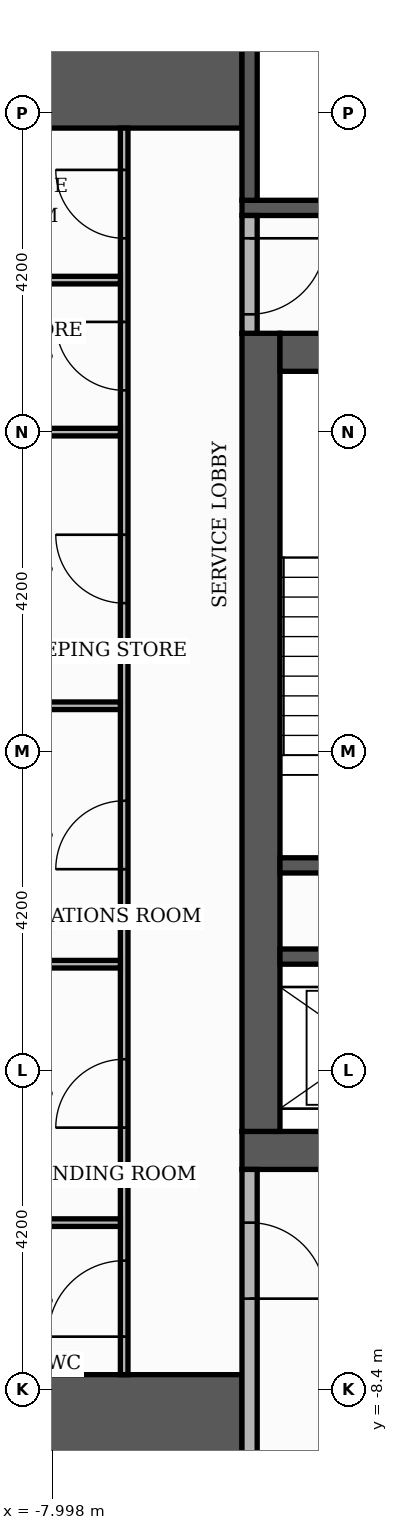
"""IFC4 building model, lengths in metres.
Left out: names, types, materials, properties, quantities, classifications, styles, units other than length and angle.
Written with IfcOpenShell. Run it as: python <this file> out.ifc"""

import sys

from ifc_helpers import new_model, si_unit, direction, frame, frame_2d, origin, place, context, subcontext, project, spatial, rectangle, extrude, element, fill, save


model = new_model("IFC4")
c1 = context("Model", 3, precision=1e-05, world=origin(), true_north=direction((0.0, 1.0)))
c2 = subcontext(c1, "Body", "Model", "MODEL_VIEW")
j1 = project(units=[si_unit("LENGTHUNIT", "METRE"), si_unit("PLANEANGLEUNIT", "RADIAN")], contexts=[c1])
p1 = place(None, origin())
s1 = spatial("IfcSite", under=j1, at=p1, CompositionType="ELEMENT")
p2 = place(p1, origin())
s2 = spatial("IfcBuilding", under=s1, at=p2, CompositionType="ELEMENT")
p3 = place(p2, frame((0.0, 0.0, 231.3)))
s3 = spatial("IfcBuildingStorey", under=s2, at=p3, CompositionType="ELEMENT", Elevation=231.3)
p4 = place(p3, frame((-5.5, -5.25, 0.0), z_axis=(0.0, 0.0, 1.0), x_axis=(1.0, 0.0, 0.0)))
e1 = element("IfcWall", 1, at=p4, inside=s3, PredefinedType="SHEAR", context=c2, shape_type="SweptSolid", body=[
    extrude(rectangle(XDim=11.0, YDim=0.5, at=frame_2d((5.5, 0.0))), origin(), (0.0, 0.0, 1.0), 3.4),
])
p5 = place(p4, frame((4.9, 0.0, 0.0)))
e2 = element("IfcOpeningElement", 2, at=p5, cuts=e1, PredefinedType="OPENING", context=c2, shape_type="SweptSolid", body=[
    extrude(rectangle(XDim=1.2, YDim=2.1, at=frame_2d((0.6, 1.05))), frame((0.0, 0.26, 0.0), z_axis=(0.0, -1.0, 0.0), x_axis=(1.0, 0.0, 0.0)), (0.0, 0.0, 1.0), 0.52),
])
p6 = place(p3, frame((-5.25, -5.0, 0.0), z_axis=(0.0, 0.0, 1.0), x_axis=(0.0, 1.0, 0.0)))
e3 = element("IfcWall", 3, at=p6, inside=s3, PredefinedType="SHEAR", context=c2, shape_type="SweptSolid", body=[
    extrude(rectangle(XDim=10.5, YDim=0.5, at=frame_2d((5.25, 0.0))), origin(), (0.0, 0.0, 1.0), 3.4),
])
p7 = place(p3, frame((-5.0, 5.25, 0.0), z_axis=(0.0, 0.0, 1.0), x_axis=(1.0, 0.0, 0.0)))
e4 = element("IfcWall", 4, at=p7, inside=s3, PredefinedType="SHEAR", context=c2, shape_type="SweptSolid", body=[
    extrude(rectangle(XDim=10.0, YDim=0.5, at=frame_2d((5.0, 0.0))), origin(), (0.0, 0.0, 1.0), 3.4),
])
p8 = place(p7, frame((4.4, 0.0, 0.0)))
e5 = element("IfcOpeningElement", 5, at=p8, cuts=e4, PredefinedType="OPENING", context=c2, shape_type="SweptSolid", body=[
    extrude(rectangle(XDim=1.2, YDim=2.1, at=frame_2d((0.6, 1.05))), frame((0.0, 0.26, 0.0), z_axis=(0.0, -1.0, 0.0), x_axis=(1.0, 0.0, 0.0)), (0.0, 0.0, 1.0), 0.52),
])
for number, where, z_axis, x_axis in (
    (6, (-10.1, -9.15, 0.0), (0.0, 0.0, 1.0), (1.0, 0.0, 0.0)),
    (7, (-10.1, 9.15, 0.0), (0.0, 0.0, 1.0), (1.0, 0.0, 0.0)),
):
    element("IfcWall", number, at=place(p3, frame(where, z_axis=z_axis, x_axis=x_axis)), inside=s3, PredefinedType="SHEAR", context=c2, shape_type="SweptSolid", body=[
        extrude(rectangle(XDim=4.6, YDim=1.9, at=frame_2d((2.3, 0.0))), origin(), (0.0, 0.0, 1.0), 3.4),
    ])
p9 = place(p3, frame((-5.0, -1.5, 0.0), z_axis=(0.0, 0.0, 1.0), x_axis=(1.0, 0.0, 0.0)))
e8 = element("IfcWall", 8, at=p9, inside=s3, PredefinedType="SHEAR", context=c2, shape_type="SweptSolid", body=[
    extrude(rectangle(XDim=3.05, YDim=0.2, at=frame_2d((1.525, 0.0))), origin(), (0.0, 0.0, 1.0), 3.4),
])
p10 = place(p3, frame((-5.5, 7.15, 0.0), z_axis=(0.0, 0.0, 1.0), x_axis=(1.0, 0.0, 0.0)))
e9 = element("IfcWall", 9, at=p10, inside=s3, PredefinedType="SHEAR", context=c2, shape_type="SweptSolid", body=[
    extrude(rectangle(XDim=6.8, YDim=0.2, at=frame_2d((3.4, 0.0))), origin(), (0.0, 0.0, 1.0), 3.4),
])
for number, where, z_axis, x_axis in (
    (10, (-5.4, 7.25, 0.0), (0.0, 0.0, 1.0), (0.0, 1.0, 0.0)),
    (11, (-5.0, -2.7, 0.0), (0.0, 0.0, 1.0), (1.0, 0.0, 0.0)),
):
    element("IfcWall", number, at=place(p3, frame(where, z_axis=z_axis, x_axis=x_axis)), inside=s3, PredefinedType="SHEAR", context=c2, shape_type="SweptSolid", body=[
        extrude(rectangle(XDim=2.85, YDim=0.2, at=frame_2d((1.425, 0.0))), origin(), (0.0, 0.0, 1.0), 3.4),
    ])
p11 = place(p3, frame((-5.4, -10.1, 0.0), z_axis=(0.0, 0.0, 1.0), x_axis=(0.0, 1.0, 0.0)))
e12 = element("IfcWall", 12, at=p11, inside=s3, PredefinedType="PARTITIONING", context=c2, shape_type="SweptSolid", body=[
    extrude(rectangle(XDim=4.6, YDim=0.2, at=frame_2d((2.3, 0.0))), origin(), (0.0, 0.0, 1.0), 3.4),
])
p12 = place(p11, frame((2.9, 0.0, 0.0)))
e13 = element("IfcOpeningElement", 13, at=p12, cuts=e12, PredefinedType="OPENING", context=c2, shape_type="SweptSolid", body=[
    extrude(rectangle(XDim=1.0, YDim=2.1, at=frame_2d((0.5, 1.05))), frame((0.0, 0.11, 0.0), z_axis=(0.0, -1.0, 0.0), x_axis=(1.0, 0.0, 0.0)), (0.0, 0.0, 1.0), 0.22),
])
p13 = place(p3, frame((-7.05, -8.2, 0.0), z_axis=(0.0, 0.0, 1.0), x_axis=(0.0, 1.0, 0.0)))
e14 = element("IfcWall", 14, at=p13, inside=s3, PredefinedType="PARTITIONING", context=c2, shape_type="SweptSolid", body=[
    extrude(rectangle(XDim=16.4, YDim=0.1, at=frame_2d((8.2, 0.0))), origin(), (0.0, 0.0, 1.0), 3.4),
])
p14 = place(p13, frame((0.5, 0.0, 0.0)))
e15 = element("IfcOpeningElement", 15, at=p14, cuts=e14, PredefinedType="OPENING", context=c2, shape_type="SweptSolid", body=[
    extrude(rectangle(XDim=1.0, YDim=2.1, at=frame_2d((0.5, 1.05))), frame((0.0, 0.06, 0.0), z_axis=(0.0, -1.0, 0.0), x_axis=(1.0, 0.0, 0.0)), (0.0, 0.0, 1.0), 0.12),
])
p15 = place(p13, frame((3.25, 0.0, 0.0)))
e16 = element("IfcOpeningElement", 16, at=p15, cuts=e14, PredefinedType="OPENING", context=c2, shape_type="SweptSolid", body=[
    extrude(rectangle(XDim=0.9, YDim=2.1, at=frame_2d((0.45, 1.05))), frame((0.0, 0.06, 0.0), z_axis=(0.0, -1.0, 0.0), x_axis=(1.0, 0.0, 0.0)), (0.0, 0.0, 1.0), 0.12),
])
p16 = place(p13, frame((6.65, 0.0, 0.0)))
e17 = element("IfcOpeningElement", 17, at=p16, cuts=e14, PredefinedType="OPENING", context=c2, shape_type="SweptSolid", body=[
    extrude(rectangle(XDim=0.9, YDim=2.1, at=frame_2d((0.45, 1.05))), frame((0.0, 0.06, 0.0), z_axis=(0.0, -1.0, 0.0), x_axis=(1.0, 0.0, 0.0)), (0.0, 0.0, 1.0), 0.12),
])
p17 = place(p13, frame((10.15, 0.0, 0.0)))
e18 = element("IfcOpeningElement", 18, at=p17, cuts=e14, PredefinedType="OPENING", context=c2, shape_type="SweptSolid", body=[
    extrude(rectangle(XDim=0.9, YDim=2.1, at=frame_2d((0.45, 1.05))), frame((0.0, 0.06, 0.0), z_axis=(0.0, -1.0, 0.0), x_axis=(1.0, 0.0, 0.0)), (0.0, 0.0, 1.0), 0.12),
])
p18 = place(p13, frame((12.95, 0.0, 0.0)))
e19 = element("IfcOpeningElement", 19, at=p18, cuts=e14, PredefinedType="OPENING", context=c2, shape_type="SweptSolid", body=[
    extrude(rectangle(XDim=0.9, YDim=2.1, at=frame_2d((0.45, 1.05))), frame((0.0, 0.06, 0.0), z_axis=(0.0, -1.0, 0.0), x_axis=(1.0, 0.0, 0.0)), (0.0, 0.0, 1.0), 0.12),
])
p19 = place(p13, frame((14.95, 0.0, 0.0)))
e20 = element("IfcOpeningElement", 20, at=p19, cuts=e14, PredefinedType="OPENING", context=c2, shape_type="SweptSolid", body=[
    extrude(rectangle(XDim=0.9, YDim=2.1, at=frame_2d((0.45, 1.05))), frame((0.0, 0.06, 0.0), z_axis=(0.0, -1.0, 0.0), x_axis=(1.0, 0.0, 0.0)), (0.0, 0.0, 1.0), 0.12),
])
for number, where, z_axis, x_axis in (
    (21, (-9.0, -6.2, 0.0), (0.0, 0.0, 1.0), (1.0, 0.0, 0.0)),
    (22, (-9.0, -2.8, 0.0), (0.0, 0.0, 1.0), (1.0, 0.0, 0.0)),
    (23, (-9.0, 0.6, 0.0), (0.0, 0.0, 1.0), (1.0, 0.0, 0.0)),
    (24, (-9.0, 4.2, 0.0), (0.0, 0.0, 1.0), (1.0, 0.0, 0.0)),
):
    element("IfcWall", number, at=place(p3, frame(where, z_axis=z_axis, x_axis=x_axis)), inside=s3, PredefinedType="PARTITIONING", context=c2, shape_type="SweptSolid", body=[
        extrude(rectangle(XDim=1.9, YDim=0.1, at=frame_2d((0.95, 0.0))), origin(), (0.0, 0.0, 1.0), 3.4),
    ])
p20 = place(p3, frame((-5.4, 5.5, 0.0), z_axis=(0.0, 0.0, 1.0), x_axis=(0.0, 1.0, 0.0)))
e25 = element("IfcWall", 25, at=p20, inside=s3, PredefinedType="PARTITIONING", context=c2, shape_type="SweptSolid", body=[
    extrude(rectangle(XDim=1.55, YDim=0.2, at=frame_2d((0.775, 0.0))), origin(), (0.0, 0.0, 1.0), 3.4),
])
p21 = place(p20, frame((0.25, 0.0, 0.0)))
e26 = element("IfcOpeningElement", 26, at=p21, cuts=e25, PredefinedType="OPENING", context=c2, shape_type="SweptSolid", body=[
    extrude(rectangle(XDim=1.0, YDim=2.1, at=frame_2d((0.5, 1.05))), frame((0.0, 0.11, 0.0), z_axis=(0.0, -1.0, 0.0), x_axis=(1.0, 0.0, 0.0)), (0.0, 0.0, 1.0), 0.22),
])
p22 = place(p3, frame((-9.0, 6.2, 0.0), z_axis=(0.0, 0.0, 1.0), x_axis=(1.0, 0.0, 0.0)))
e27 = element("IfcWall", 27, at=p22, inside=s3, PredefinedType="PARTITIONING", context=c2, shape_type="SweptSolid", body=[
    extrude(rectangle(XDim=1.9, YDim=0.1, at=frame_2d((0.95, 0.0))), origin(), (0.0, 0.0, 1.0), 3.4),
])
p23 = place(p21, frame((1.0, 0.0, 0.0), z_axis=(0.0, 0.0, 1.0), x_axis=(-1.0, 0.0, 0.0)))
e28 = element("IfcDoor", 28, at=p23, inside=s3, OperationType="SINGLE_SWING_RIGHT", PredefinedType="DOOR", context=c2, shape_type="SweptSolid", body=[
    extrude(rectangle(XDim=1.0, YDim=2.1, at=frame_2d((0.5, 1.05))), frame((0.0, 0.025, 0.0), z_axis=(0.0, -1.0, 0.0), x_axis=(1.0, 0.0, 0.0)), (0.0, 0.0, 1.0), 0.05),
])
fill(e26, e28)
p24 = place(p12, frame((1.0, 0.0, 0.0), z_axis=(0.0, 0.0, 1.0), x_axis=(-1.0, 0.0, 0.0)))
e29 = element("IfcDoor", 29, at=p24, inside=s3, OperationType="SINGLE_SWING_LEFT", PredefinedType="DOOR", context=c2, shape_type="SweptSolid", body=[
    extrude(rectangle(XDim=1.0, YDim=2.1, at=frame_2d((0.5, 1.05))), frame((0.0, 0.025, 0.0), z_axis=(0.0, -1.0, 0.0), x_axis=(1.0, 0.0, 0.0)), (0.0, 0.0, 1.0), 0.05),
])
fill(e13, e29)
p25 = place(p14, origin())
e30 = element("IfcDoor", 30, at=p25, inside=s3, OperationType="SINGLE_SWING_LEFT", PredefinedType="DOOR", context=c2, shape_type="SweptSolid", body=[
    extrude(rectangle(XDim=1.0, YDim=2.1, at=frame_2d((0.5, 1.05))), frame((0.0, 0.025, 0.0), z_axis=(0.0, -1.0, 0.0), x_axis=(1.0, 0.0, 0.0)), (0.0, 0.0, 1.0), 0.05),
])
fill(e15, e30)
p26 = place(p15, origin())
e31 = element("IfcDoor", 31, at=p26, inside=s3, OperationType="SINGLE_SWING_LEFT", PredefinedType="DOOR", context=c2, shape_type="SweptSolid", body=[
    extrude(rectangle(XDim=0.9, YDim=2.1, at=frame_2d((0.45, 1.05))), frame((0.0, 0.025, 0.0), z_axis=(0.0, -1.0, 0.0), x_axis=(1.0, 0.0, 0.0)), (0.0, 0.0, 1.0), 0.05),
])
fill(e16, e31)
p27 = place(p16, origin())
e32 = element("IfcDoor", 32, at=p27, inside=s3, OperationType="SINGLE_SWING_LEFT", PredefinedType="DOOR", context=c2, shape_type="SweptSolid", body=[
    extrude(rectangle(XDim=0.9, YDim=2.1, at=frame_2d((0.45, 1.05))), frame((0.0, 0.025, 0.0), z_axis=(0.0, -1.0, 0.0), x_axis=(1.0, 0.0, 0.0)), (0.0, 0.0, 1.0), 0.05),
])
fill(e17, e32)
p28 = place(p17, origin())
e33 = element("IfcDoor", 33, at=p28, inside=s3, OperationType="SINGLE_SWING_RIGHT", PredefinedType="DOOR", context=c2, shape_type="SweptSolid", body=[
    extrude(rectangle(XDim=0.9, YDim=2.1, at=frame_2d((0.45, 1.05))), frame((0.0, 0.025, 0.0), z_axis=(0.0, -1.0, 0.0), x_axis=(1.0, 0.0, 0.0)), (0.0, 0.0, 1.0), 0.05),
])
fill(e18, e33)
p29 = place(p18, origin())
e34 = element("IfcDoor", 34, at=p29, inside=s3, OperationType="SINGLE_SWING_RIGHT", PredefinedType="DOOR", context=c2, shape_type="SweptSolid", body=[
    extrude(rectangle(XDim=0.9, YDim=2.1, at=frame_2d((0.45, 1.05))), frame((0.0, 0.025, 0.0), z_axis=(0.0, -1.0, 0.0), x_axis=(1.0, 0.0, 0.0)), (0.0, 0.0, 1.0), 0.05),
])
fill(e19, e34)
p30 = place(p19, origin())
e35 = element("IfcDoor", 35, at=p30, inside=s3, OperationType="SINGLE_SWING_RIGHT", PredefinedType="DOOR", context=c2, shape_type="SweptSolid", body=[
    extrude(rectangle(XDim=0.9, YDim=2.1, at=frame_2d((0.45, 1.05))), frame((0.0, 0.025, 0.0), z_axis=(0.0, -1.0, 0.0), x_axis=(1.0, 0.0, 0.0)), (0.0, 0.0, 1.0), 0.05),
])
fill(e20, e35)
save(model, sys.argv[1])
